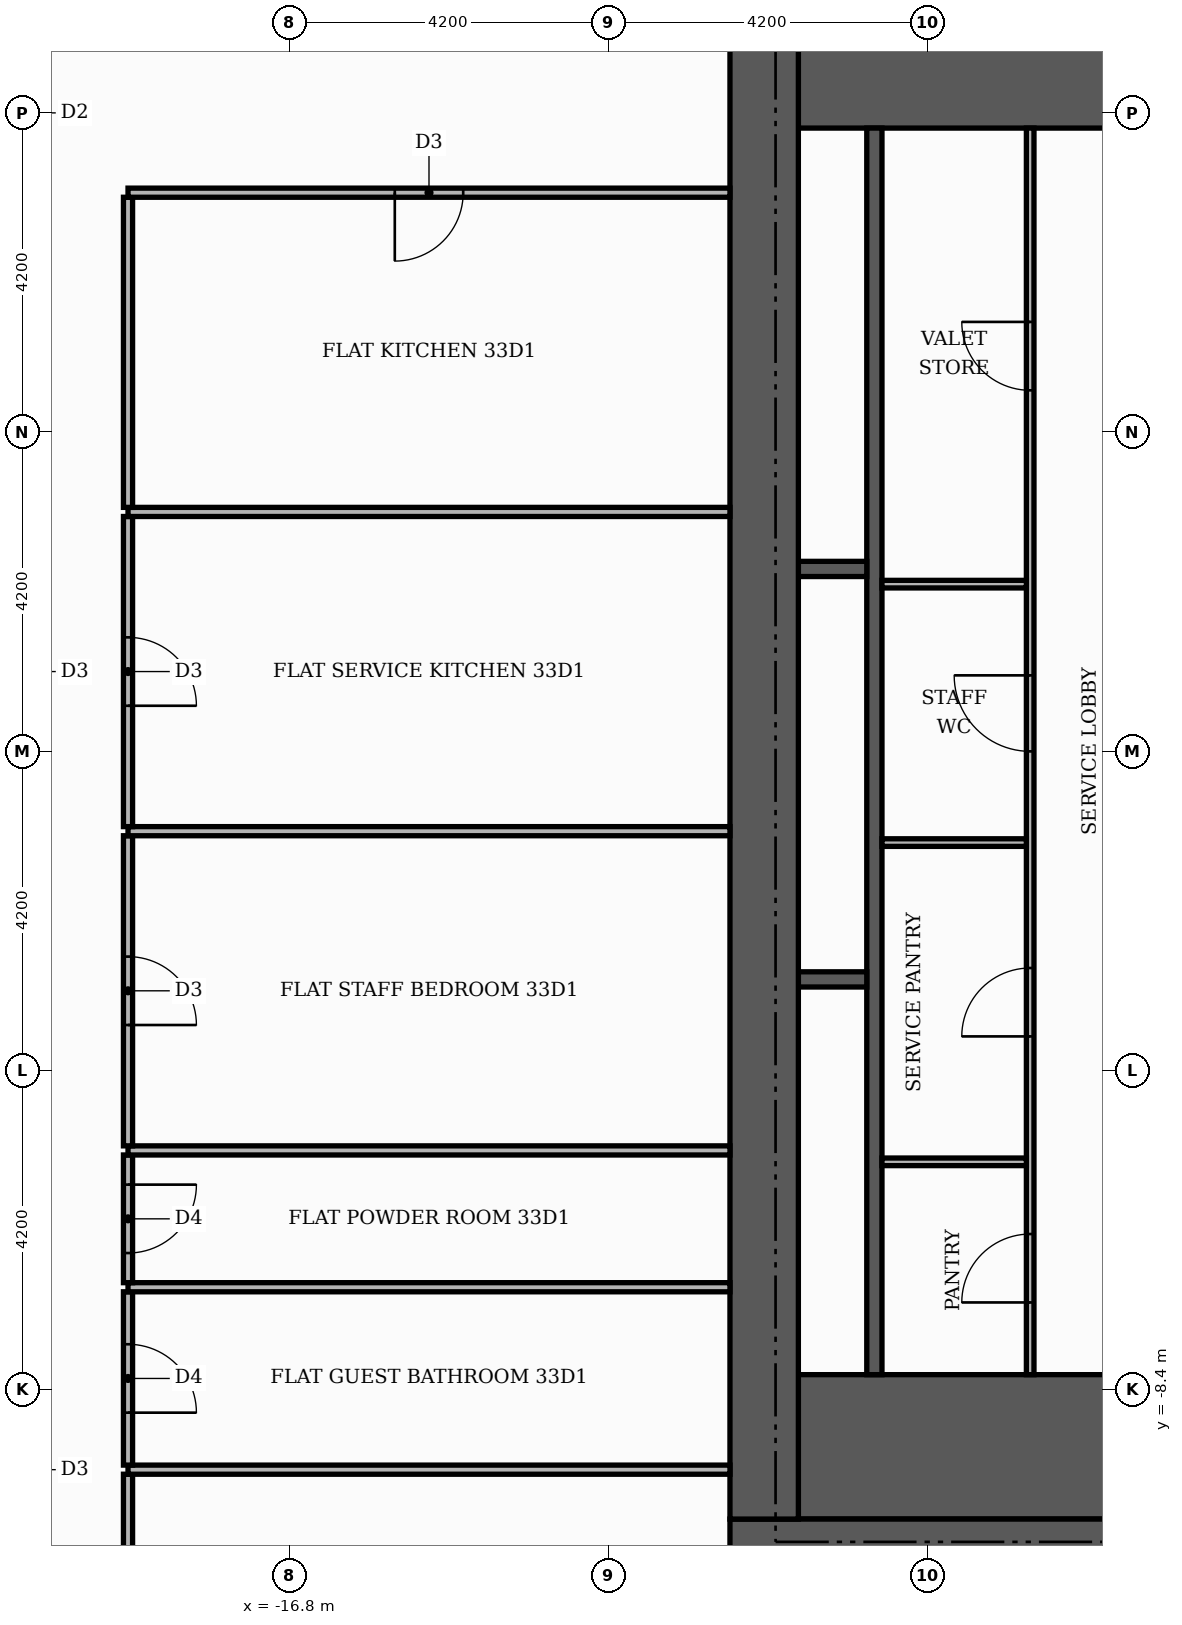
"""IFC4 building model, lengths in metres.
Left out: names, types, materials, properties, quantities, classifications, styles, units other than length and angle.
Written with IfcOpenShell. Run it as: python <this file> out.ifc"""

import sys

from ifc_helpers import new_model, si_unit, direction, frame, frame_2d, origin, place, context, subcontext, project, spatial, rectangle, extrude, element, fill, save


model = new_model("IFC4")
c1 = context("Model", 3, precision=1e-05, world=origin(), true_north=direction((0.0, 1.0)))
c2 = subcontext(c1, "Body", "Model", "MODEL_VIEW")
j1 = project(units=[si_unit("LENGTHUNIT", "METRE"), si_unit("PLANEANGLEUNIT", "RADIAN")], contexts=[c1])
p1 = place(None, origin())
s1 = spatial("IfcSite", under=j1, at=p1, CompositionType="ELEMENT")
p2 = place(p1, origin())
s2 = spatial("IfcBuilding", under=s1, at=p2, CompositionType="ELEMENT")
p3 = place(p2, frame((0.0, 0.0, 141.6)))
s3 = spatial("IfcBuildingStorey", under=s2, at=p3, CompositionType="ELEMENT", Elevation=141.6)
for number, where, z_axis, x_axis in (
    (1, (-10.1, -9.15, 0.0), (0.0, 0.0, 1.0), (1.0, 0.0, 0.0)),
    (2, (-10.1, 9.15, 0.0), (0.0, 0.0, 1.0), (1.0, 0.0, 0.0)),
):
    element("IfcWall", number, at=place(p3, frame(where, z_axis=z_axis, x_axis=x_axis)), inside=s3, PredefinedType="SHEAR", context=c2, shape_type="SweptSolid", body=[
        extrude(rectangle(XDim=4.6, YDim=1.9, at=frame_2d((2.3, 0.0))), origin(), (0.0, 0.0, 1.0), 3.48),
    ])
p4 = place(p3, frame((-9.1, -8.2, 0.0), z_axis=(0.0, 0.0, 1.0), x_axis=(0.0, 1.0, 0.0)))
e3 = element("IfcWall", 3, at=p4, inside=s3, PredefinedType="SHEAR", context=c2, shape_type="SweptSolid", body=[
    extrude(rectangle(XDim=16.4, YDim=0.2, at=frame_2d((8.2, 0.0))), origin(), (0.0, 0.0, 1.0), 3.48),
])
for number, where, z_axis, x_axis in (
    (4, (-10.1, -3.0, 0.0), (0.0, 0.0, 1.0), (1.0, 0.0, 0.0)),
    (5, (-10.1, 2.4, 0.0), (0.0, 0.0, 1.0), (1.0, 0.0, 0.0)),
):
    element("IfcWall", number, at=place(p3, frame(where, z_axis=z_axis, x_axis=x_axis)), inside=s3, PredefinedType="SHEAR", context=c2, shape_type="SweptSolid", body=[
        extrude(rectangle(XDim=0.9, YDim=0.2, at=frame_2d((0.45, 0.0))), origin(), (0.0, 0.0, 1.0), 3.48),
    ])
p5 = place(p3, frame((-11.0, -10.55, 0.0), z_axis=(0.0, 0.0, 1.0), x_axis=(1.0, 0.0, 0.0)))
e6 = element("IfcWall", 6, at=p5, inside=s3, PredefinedType="SHEAR", context=c2, shape_type="SweptSolid", body=[
    extrude(rectangle(XDim=22.0, YDim=0.9, at=frame_2d((11.0, 0.0))), origin(), (0.0, 0.0, 1.0), 3.48),
])
p6 = place(p5, frame((7.4, 0.0, 0.0)))
e7 = element("IfcOpeningElement", 7, at=p6, cuts=e6, PredefinedType="OPENING", context=c2, shape_type="SweptSolid", body=[
    extrude(rectangle(XDim=1.8, YDim=2.2, at=frame_2d((0.9, 1.1))), frame((0.0, 0.46, 0.0), z_axis=(0.0, -1.0, 0.0), x_axis=(1.0, 0.0, 0.0)), (0.0, 0.0, 1.0), 0.92),
])
p7 = place(p3, frame((-10.55, -10.1, 0.0), z_axis=(0.0, 0.0, 1.0), x_axis=(0.0, 1.0, 0.0)))
e8 = element("IfcWall", 8, at=p7, inside=s3, PredefinedType="SHEAR", context=c2, shape_type="SweptSolid", body=[
    extrude(rectangle(XDim=20.2, YDim=0.9, at=frame_2d((10.1, 0.0))), origin(), (0.0, 0.0, 1.0), 3.48),
])
p8 = place(p3, frame((-7.05, -8.2, 0.0), z_axis=(0.0, 0.0, 1.0), x_axis=(0.0, 1.0, 0.0)))
e9 = element("IfcWall", 9, at=p8, inside=s3, PredefinedType="PARTITIONING", context=c2, shape_type="SweptSolid", body=[
    extrude(rectangle(XDim=16.4, YDim=0.1, at=frame_2d((8.2, 0.0))), origin(), (0.0, 0.0, 1.0), 3.48),
])
p9 = place(p8, frame((0.95, 0.0, 0.0)))
e10 = element("IfcOpeningElement", 10, at=p9, cuts=e9, PredefinedType="OPENING", context=c2, shape_type="SweptSolid", body=[
    extrude(rectangle(XDim=0.9, YDim=2.1, at=frame_2d((0.45, 1.05))), frame((0.0, 0.06, 0.0), z_axis=(0.0, -1.0, 0.0), x_axis=(1.0, 0.0, 0.0)), (0.0, 0.0, 1.0), 0.12),
])
p10 = place(p8, frame((4.45, 0.0, 0.0)))
e11 = element("IfcOpeningElement", 11, at=p10, cuts=e9, PredefinedType="OPENING", context=c2, shape_type="SweptSolid", body=[
    extrude(rectangle(XDim=0.9, YDim=2.1, at=frame_2d((0.45, 1.05))), frame((0.0, 0.06, 0.0), z_axis=(0.0, -1.0, 0.0), x_axis=(1.0, 0.0, 0.0)), (0.0, 0.0, 1.0), 0.12),
])
p11 = place(p8, frame((8.2, 0.0, 0.0)))
e12 = element("IfcOpeningElement", 12, at=p11, cuts=e9, PredefinedType="OPENING", context=c2, shape_type="SweptSolid", body=[
    extrude(rectangle(XDim=1.0, YDim=2.1, at=frame_2d((0.5, 1.05))), frame((0.0, 0.06, 0.0), z_axis=(0.0, -1.0, 0.0), x_axis=(1.0, 0.0, 0.0)), (0.0, 0.0, 1.0), 0.12),
])
p12 = place(p8, frame((12.95, 0.0, 0.0)))
e13 = element("IfcOpeningElement", 13, at=p12, cuts=e9, PredefinedType="OPENING", context=c2, shape_type="SweptSolid", body=[
    extrude(rectangle(XDim=0.9, YDim=2.1, at=frame_2d((0.45, 1.05))), frame((0.0, 0.06, 0.0), z_axis=(0.0, -1.0, 0.0), x_axis=(1.0, 0.0, 0.0)), (0.0, 0.0, 1.0), 0.12),
])
for number, where, z_axis, x_axis in (
    (14, (-9.0, -5.4, 0.0), (0.0, 0.0, 1.0), (1.0, 0.0, 0.0)),
    (15, (-9.0, -1.2, 0.0), (0.0, 0.0, 1.0), (1.0, 0.0, 0.0)),
    (16, (-9.0, 2.2, 0.0), (0.0, 0.0, 1.0), (1.0, 0.0, 0.0)),
):
    element("IfcWall", number, at=place(p3, frame(where, z_axis=z_axis, x_axis=x_axis)), inside=s3, PredefinedType="PARTITIONING", context=c2, shape_type="SweptSolid", body=[
        extrude(rectangle(XDim=1.9, YDim=0.1, at=frame_2d((0.95, 0.0))), origin(), (0.0, 0.0, 1.0), 3.48),
    ])
p13 = place(p3, frame((-18.92, -13.55, 0.0), z_axis=(0.0, 0.0, 1.0), x_axis=(0.0, 1.0, 0.0)))
e17 = element("IfcWall", 17, at=p13, inside=s3, PredefinedType="PARTITIONING", context=c2, shape_type="SweptSolid", body=[
    extrude(rectangle(XDim=4.04, YDim=0.12, at=frame_2d((2.02, 0.0))), origin(), (0.0, 0.0, 1.0), 3.48),
])
p14 = place(p13, frame((1.55, 0.0, 0.0)))
e18 = element("IfcOpeningElement", 18, at=p14, cuts=e17, PredefinedType="OPENING", context=c2, shape_type="SweptSolid", body=[
    extrude(rectangle(XDim=0.9, YDim=2.1, at=frame_2d((0.45, 1.05))), frame((0.0, 0.07, 0.0), z_axis=(0.0, -1.0, 0.0), x_axis=(1.0, 0.0, 0.0)), (0.0, 0.0, 1.0), 0.14),
])
p15 = place(p3, frame((-18.92, -9.45, 0.0), z_axis=(0.0, 0.0, 1.0), x_axis=(1.0, 0.0, 0.0)))
e19 = element("IfcWall", 19, at=p15, inside=s3, PredefinedType="PARTITIONING", context=c2, shape_type="SweptSolid", body=[
    extrude(rectangle(XDim=7.92, YDim=0.12, at=frame_2d((3.96, 0.0))), origin(), (0.0, 0.0, 1.0), 3.48),
])
p16 = place(p3, frame((-18.92, -9.39, 0.0), z_axis=(0.0, 0.0, 1.0), x_axis=(0.0, 1.0, 0.0)))
e20 = element("IfcWall", 20, at=p16, inside=s3, PredefinedType="PARTITIONING", context=c2, shape_type="SweptSolid", body=[
    extrude(rectangle(XDim=2.28, YDim=0.12, at=frame_2d((1.14, 0.0))), origin(), (0.0, 0.0, 1.0), 3.48),
])
p17 = place(p16, frame((0.69, 0.0, 0.0)))
e21 = element("IfcOpeningElement", 21, at=p17, cuts=e20, PredefinedType="OPENING", context=c2, shape_type="SweptSolid", body=[
    extrude(rectangle(XDim=0.9, YDim=2.1, at=frame_2d((0.45, 1.05))), frame((0.0, 0.07, 0.0), z_axis=(0.0, -1.0, 0.0), x_axis=(1.0, 0.0, 0.0)), (0.0, 0.0, 1.0), 0.14),
])
p18 = place(p3, frame((-18.92, -7.05, 0.0), z_axis=(0.0, 0.0, 1.0), x_axis=(1.0, 0.0, 0.0)))
e22 = element("IfcWall", 22, at=p18, inside=s3, PredefinedType="PARTITIONING", context=c2, shape_type="SweptSolid", body=[
    extrude(rectangle(XDim=7.92, YDim=0.12, at=frame_2d((3.96, 0.0))), origin(), (0.0, 0.0, 1.0), 3.48),
])
p19 = place(p3, frame((-18.92, -6.99, 0.0), z_axis=(0.0, 0.0, 1.0), x_axis=(0.0, 1.0, 0.0)))
e23 = element("IfcWall", 23, at=p19, inside=s3, PredefinedType="PARTITIONING", context=c2, shape_type="SweptSolid", body=[
    extrude(rectangle(XDim=1.68, YDim=0.12, at=frame_2d((0.84, 0.0))), origin(), (0.0, 0.0, 1.0), 3.48),
])
p20 = place(p19, frame((0.39, 0.0, 0.0)))
e24 = element("IfcOpeningElement", 24, at=p20, cuts=e23, PredefinedType="OPENING", context=c2, shape_type="SweptSolid", body=[
    extrude(rectangle(XDim=0.9, YDim=2.1, at=frame_2d((0.45, 1.05))), frame((0.0, 0.07, 0.0), z_axis=(0.0, -1.0, 0.0), x_axis=(1.0, 0.0, 0.0)), (0.0, 0.0, 1.0), 0.14),
])
p21 = place(p3, frame((-18.92, -5.25, 0.0), z_axis=(0.0, 0.0, 1.0), x_axis=(1.0, 0.0, 0.0)))
e25 = element("IfcWall", 25, at=p21, inside=s3, PredefinedType="PARTITIONING", context=c2, shape_type="SweptSolid", body=[
    extrude(rectangle(XDim=7.92, YDim=0.12, at=frame_2d((3.96, 0.0))), origin(), (0.0, 0.0, 1.0), 3.48),
])
p22 = place(p3, frame((-18.92, -5.19, 0.0), z_axis=(0.0, 0.0, 1.0), x_axis=(0.0, 1.0, 0.0)))
e26 = element("IfcWall", 26, at=p22, inside=s3, PredefinedType="PARTITIONING", context=c2, shape_type="SweptSolid", body=[
    extrude(rectangle(XDim=4.08, YDim=0.12, at=frame_2d((2.04, 0.0))), origin(), (0.0, 0.0, 1.0), 3.48),
])
p23 = place(p22, frame((1.59, 0.0, 0.0)))
e27 = element("IfcOpeningElement", 27, at=p23, cuts=e26, PredefinedType="OPENING", context=c2, shape_type="SweptSolid", body=[
    extrude(rectangle(XDim=0.9, YDim=2.1, at=frame_2d((0.45, 1.05))), frame((0.0, 0.07, 0.0), z_axis=(0.0, -1.0, 0.0), x_axis=(1.0, 0.0, 0.0)), (0.0, 0.0, 1.0), 0.14),
])
p24 = place(p3, frame((-18.92, -1.05, 0.0), z_axis=(0.0, 0.0, 1.0), x_axis=(1.0, 0.0, 0.0)))
e28 = element("IfcWall", 28, at=p24, inside=s3, PredefinedType="PARTITIONING", context=c2, shape_type="SweptSolid", body=[
    extrude(rectangle(XDim=7.92, YDim=0.12, at=frame_2d((3.96, 0.0))), origin(), (0.0, 0.0, 1.0), 3.48),
])
p25 = place(p3, frame((-18.92, -0.99, 0.0), z_axis=(0.0, 0.0, 1.0), x_axis=(0.0, 1.0, 0.0)))
e29 = element("IfcWall", 29, at=p25, inside=s3, PredefinedType="PARTITIONING", context=c2, shape_type="SweptSolid", body=[
    extrude(rectangle(XDim=4.08, YDim=0.12, at=frame_2d((2.04, 0.0))), origin(), (0.0, 0.0, 1.0), 3.48),
])
p26 = place(p25, frame((1.59, 0.0, 0.0)))
e30 = element("IfcOpeningElement", 30, at=p26, cuts=e29, PredefinedType="OPENING", context=c2, shape_type="SweptSolid", body=[
    extrude(rectangle(XDim=0.9, YDim=2.1, at=frame_2d((0.45, 1.05))), frame((0.0, 0.07, 0.0), z_axis=(0.0, -1.0, 0.0), x_axis=(1.0, 0.0, 0.0)), (0.0, 0.0, 1.0), 0.14),
])
p27 = place(p3, frame((-18.92, 3.15, 0.0), z_axis=(0.0, 0.0, 1.0), x_axis=(1.0, 0.0, 0.0)))
e31 = element("IfcWall", 31, at=p27, inside=s3, PredefinedType="PARTITIONING", context=c2, shape_type="SweptSolid", body=[
    extrude(rectangle(XDim=7.92, YDim=0.12, at=frame_2d((3.96, 0.0))), origin(), (0.0, 0.0, 1.0), 3.48),
])
p28 = place(p3, frame((-18.92, 3.21, 0.0), z_axis=(0.0, 0.0, 1.0), x_axis=(0.0, 1.0, 0.0)))
e32 = element("IfcWall", 32, at=p28, inside=s3, PredefinedType="PARTITIONING", context=c2, shape_type="SweptSolid", body=[
    extrude(rectangle(XDim=4.08, YDim=0.12, at=frame_2d((2.04, 0.0))), origin(), (0.0, 0.0, 1.0), 3.48),
])
p29 = place(p3, frame((-18.92, 7.35, 0.0), z_axis=(0.0, 0.0, 1.0), x_axis=(1.0, 0.0, 0.0)))
e33 = element("IfcWall", 33, at=p29, inside=s3, PredefinedType="PARTITIONING", context=c2, shape_type="SweptSolid", body=[
    extrude(rectangle(XDim=7.92, YDim=0.12, at=frame_2d((3.96, 0.0))), origin(), (0.0, 0.0, 1.0), 3.48),
])
p30 = place(p29, frame((3.51, 0.0, 0.0)))
e34 = element("IfcOpeningElement", 34, at=p30, cuts=e33, PredefinedType="OPENING", context=c2, shape_type="SweptSolid", body=[
    extrude(rectangle(XDim=0.9, YDim=2.1, at=frame_2d((0.45, 1.05))), frame((0.0, 0.07, 0.0), z_axis=(0.0, -1.0, 0.0), x_axis=(1.0, 0.0, 0.0)), (0.0, 0.0, 1.0), 0.14),
])
p31 = place(p9, origin())
e35 = element("IfcDoor", 35, at=p31, inside=s3, OperationType="SINGLE_SWING_LEFT", PredefinedType="DOOR", context=c2, shape_type="SweptSolid", body=[
    extrude(rectangle(XDim=0.9, YDim=2.1, at=frame_2d((0.45, 1.05))), frame((0.0, 0.025, 0.0), z_axis=(0.0, -1.0, 0.0), x_axis=(1.0, 0.0, 0.0)), (0.0, 0.0, 1.0), 0.05),
])
fill(e10, e35)
p32 = place(p10, origin())
e36 = element("IfcDoor", 36, at=p32, inside=s3, OperationType="SINGLE_SWING_LEFT", PredefinedType="DOOR", context=c2, shape_type="SweptSolid", body=[
    extrude(rectangle(XDim=0.9, YDim=2.1, at=frame_2d((0.45, 1.05))), frame((0.0, 0.025, 0.0), z_axis=(0.0, -1.0, 0.0), x_axis=(1.0, 0.0, 0.0)), (0.0, 0.0, 1.0), 0.05),
])
fill(e11, e36)
p33 = place(p11, origin())
e37 = element("IfcDoor", 37, at=p33, inside=s3, OperationType="SINGLE_SWING_RIGHT", PredefinedType="DOOR", context=c2, shape_type="SweptSolid", body=[
    extrude(rectangle(XDim=1.0, YDim=2.1, at=frame_2d((0.5, 1.05))), frame((0.0, 0.025, 0.0), z_axis=(0.0, -1.0, 0.0), x_axis=(1.0, 0.0, 0.0)), (0.0, 0.0, 1.0), 0.05),
])
fill(e12, e37)
p34 = place(p12, origin())
e38 = element("IfcDoor", 38, at=p34, inside=s3, OperationType="SINGLE_SWING_RIGHT", PredefinedType="DOOR", context=c2, shape_type="SweptSolid", body=[
    extrude(rectangle(XDim=0.9, YDim=2.1, at=frame_2d((0.45, 1.05))), frame((0.0, 0.025, 0.0), z_axis=(0.0, -1.0, 0.0), x_axis=(1.0, 0.0, 0.0)), (0.0, 0.0, 1.0), 0.05),
])
fill(e13, e38)
p35 = place(p30, frame((0.9, 0.0, 0.0), z_axis=(0.0, 0.0, 1.0), x_axis=(-1.0, 0.0, 0.0)))
e39 = element("IfcDoor", 39, at=p35, inside=s3, OperationType="SINGLE_SWING_LEFT", PredefinedType="DOOR", context=c2, shape_type="SweptSolid", body=[
    extrude(rectangle(XDim=0.9, YDim=2.1, at=frame_2d((0.45, 1.05))), frame((0.0, 0.025, 0.0), z_axis=(0.0, -1.0, 0.0), x_axis=(1.0, 0.0, 0.0)), (0.0, 0.0, 1.0), 0.05),
])
fill(e34, e39)
p36 = place(p26, frame((0.9, 0.0, 0.0), z_axis=(0.0, 0.0, 1.0), x_axis=(-1.0, 0.0, 0.0)))
e40 = element("IfcDoor", 40, at=p36, inside=s3, OperationType="SINGLE_SWING_LEFT", PredefinedType="DOOR", context=c2, shape_type="SweptSolid", body=[
    extrude(rectangle(XDim=0.9, YDim=2.1, at=frame_2d((0.45, 1.05))), frame((0.0, 0.025, 0.0), z_axis=(0.0, -1.0, 0.0), x_axis=(1.0, 0.0, 0.0)), (0.0, 0.0, 1.0), 0.05),
])
fill(e30, e40)
p37 = place(p23, frame((0.9, 0.0, 0.0), z_axis=(0.0, 0.0, 1.0), x_axis=(-1.0, 0.0, 0.0)))
e41 = element("IfcDoor", 41, at=p37, inside=s3, OperationType="SINGLE_SWING_LEFT", PredefinedType="DOOR", context=c2, shape_type="SweptSolid", body=[
    extrude(rectangle(XDim=0.9, YDim=2.1, at=frame_2d((0.45, 1.05))), frame((0.0, 0.025, 0.0), z_axis=(0.0, -1.0, 0.0), x_axis=(1.0, 0.0, 0.0)), (0.0, 0.0, 1.0), 0.05),
])
fill(e27, e41)
p38 = place(p20, frame((0.9, 0.0, 0.0), z_axis=(0.0, 0.0, 1.0), x_axis=(-1.0, 0.0, 0.0)))
e42 = element("IfcDoor", 42, at=p38, inside=s3, OperationType="SINGLE_SWING_RIGHT", PredefinedType="DOOR", context=c2, shape_type="SweptSolid", body=[
    extrude(rectangle(XDim=0.9, YDim=2.1, at=frame_2d((0.45, 1.05))), frame((0.0, 0.025, 0.0), z_axis=(0.0, -1.0, 0.0), x_axis=(1.0, 0.0, 0.0)), (0.0, 0.0, 1.0), 0.05),
])
fill(e24, e42)
p39 = place(p17, frame((0.9, 0.0, 0.0), z_axis=(0.0, 0.0, 1.0), x_axis=(-1.0, 0.0, 0.0)))
e43 = element("IfcDoor", 43, at=p39, inside=s3, OperationType="SINGLE_SWING_LEFT", PredefinedType="DOOR", context=c2, shape_type="SweptSolid", body=[
    extrude(rectangle(XDim=0.9, YDim=2.1, at=frame_2d((0.45, 1.05))), frame((0.0, 0.025, 0.0), z_axis=(0.0, -1.0, 0.0), x_axis=(1.0, 0.0, 0.0)), (0.0, 0.0, 1.0), 0.05),
])
fill(e21, e43)
save(model, sys.argv[1])
